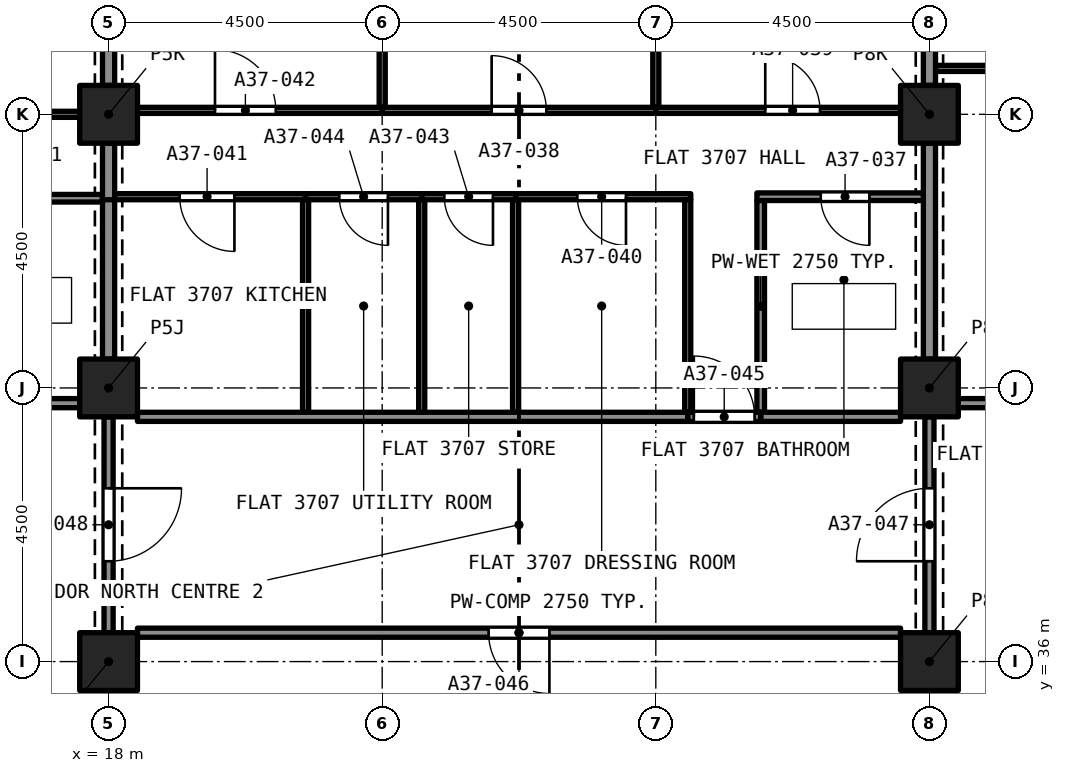
"""IFC4 building model, lengths in metres.
Left out: names, types, materials, properties, quantities, classifications, styles, units other than length and angle.
Written with IfcOpenShell. Run it as: python <this file> out.ifc"""

import sys

from ifc_helpers import new_model, si_unit, direction, frame, frame_2d, origin, origin_2d, place, context, subcontext, project, spatial, rectangle, extrude, element, fill, save


model = new_model("IFC4")
c1 = context("Model", 3, precision=1e-05, world=origin(), true_north=direction((0.0, 1.0)))
c2 = subcontext(c1, "Body", "Model", "MODEL_VIEW")
j1 = project(units=[si_unit("LENGTHUNIT", "METRE"), si_unit("PLANEANGLEUNIT", "RADIAN")], contexts=[c1])
p1 = place(None, origin())
s1 = spatial("IfcSite", under=j1, at=p1, CompositionType="ELEMENT")
p2 = place(p1, origin())
s2 = spatial("IfcBuilding", under=s1, at=p2, CompositionType="ELEMENT")
p3 = place(p2, frame((0.0, 0.0, 133.4)))
s3 = spatial("IfcBuildingStorey", under=s2, at=p3, CompositionType="ELEMENT", Elevation=133.4)
for number, where, z_axis, x_axis in (
    (1, (18.0, 36.0, 0.0), (0.0, 0.0, 1.0), (1.0, 0.0, 0.0)),
    (2, (31.5, 36.0, 0.0), (0.0, 0.0, 1.0), (1.0, 0.0, 0.0)),
    (3, (18.0, 40.5, 0.0), (0.0, 0.0, 1.0), (1.0, 0.0, 0.0)),
    (4, (31.5, 40.5, 0.0), (0.0, 0.0, 1.0), (1.0, 0.0, 0.0)),
    (5, (18.0, 45.0, 0.0), (0.0, 0.0, 1.0), (1.0, 0.0, 0.0)),
    (6, (31.5, 45.0, 0.0), (0.0, 0.0, 1.0), (1.0, 0.0, 0.0)),
):
    element("IfcColumn", number, at=place(p3, frame(where, z_axis=z_axis, x_axis=x_axis)), inside=s3, PredefinedType="COLUMN", context=c2, shape_type="SweptSolid", body=[
        extrude(rectangle(XDim=0.95, YDim=0.95, at=origin_2d()), origin(), (0.0, 0.0, 1.0), 3.2),
    ])
p4 = place(p3, frame((17.9, 43.62, 0.0), z_axis=(0.0, 0.0, 1.0), x_axis=(-1.0, 0.0, 0.0)))
e7 = element("IfcWall", 7, at=p4, inside=s3, PredefinedType="PARTITIONING", context=c2, shape_type="SweptSolid", body=[
    extrude(rectangle(XDim=2.781, YDim=0.125, at=frame_2d((1.39, 0.0))), origin(), (0.0, 0.0, 1.0), 2.9),
])
p5 = place(p4, frame((0.94, 0.0, 0.0)))
e8 = element("IfcOpeningElement", 8, at=p5, cuts=e7, PredefinedType="OPENING", context=c2, shape_type="SweptSolid", body=[
    extrude(rectangle(XDim=0.8, YDim=2.1, at=frame_2d((0.4, 1.05))), frame((0.0, 0.073, 0.0), z_axis=(0.0, -1.0, 0.0), x_axis=(1.0, 0.0, 0.0)), (0.0, 0.0, 1.0), 0.145),
])
p6 = place(p3, frame((18.0, 40.975, 0.0), z_axis=(0.0, 0.0, 1.0), x_axis=(0.0, 1.0, 0.0)))
e9 = element("IfcWall", 9, at=p6, inside=s3, PredefinedType="PARTITIONING", context=c2, shape_type="SweptSolid", body=[
    extrude(rectangle(XDim=2.708, YDim=0.2, at=frame_2d((1.354, 0.0))), origin(), (0.0, 0.0, 1.0), 2.38),
])
p7 = place(p3, frame((13.5, 45.0, 0.0), z_axis=(0.0, 0.0, 1.0), x_axis=(1.0, 0.0, 0.0)))
e10 = element("IfcWall", 10, at=p7, inside=s3, PredefinedType="PARTITIONING", context=c2, shape_type="SweptSolid", body=[
    extrude(rectangle(XDim=4.025, YDim=0.1, at=frame_2d((2.012, 0.0))), origin(), (0.0, 0.0, 1.0), 2.9),
])
p8 = place(p7, frame((1.8, 0.0, 0.0)))
e11 = element("IfcOpeningElement", 11, at=p8, cuts=e10, PredefinedType="OPENING", context=c2, shape_type="SweptSolid", body=[
    extrude(rectangle(XDim=0.9, YDim=2.1, at=frame_2d((0.45, 1.05))), frame((0.0, 0.06, 0.0), z_axis=(0.0, -1.0, 0.0), x_axis=(1.0, 0.0, 0.0)), (0.0, 0.0, 1.0), 0.12),
])
p9 = place(p3, frame((18.0, 45.475, 0.0), z_axis=(0.0, 0.0, 1.0), x_axis=(0.0, 1.0, 0.0)))
e12 = element("IfcWall", 12, at=p9, inside=s3, PredefinedType="PARTITIONING", context=c2, shape_type="SweptSolid", body=[
    extrude(rectangle(XDim=3.55, YDim=0.2, at=frame_2d((1.775, 0.0))), origin(), (0.0, 0.0, 1.0), 2.38),
])
p10 = place(p3, frame((18.0, 43.595, 0.0), z_axis=(0.0, 0.0, 1.0), x_axis=(0.0, 1.0, 0.0)))
e13 = element("IfcWall", 13, at=p10, inside=s3, PredefinedType="PARTITIONING", context=c2, shape_type="SweptSolid", body=[
    extrude(rectangle(XDim=0.93, YDim=0.2, at=frame_2d((0.465, 0.0))), origin(), (0.0, 0.0, 1.0), 2.38),
])
p11 = place(p3, frame((13.25, 40.25, 0.0), z_axis=(0.0, 0.0, 1.0), x_axis=(1.0, 0.0, 0.0)))
e14 = element("IfcWall", 14, at=p11, inside=s3, PredefinedType="PARTITIONING", context=c2, shape_type="SweptSolid", body=[
    extrude(rectangle(XDim=4.275, YDim=0.15, at=frame_2d((2.137, 0.0))), origin(), (0.0, 0.0, 1.0), 2.9),
])
p12 = place(p3, frame((31.6, 45.755, 0.0), z_axis=(0.0, 0.0, 1.0), x_axis=(1.0, 0.0, 0.0)))
e15 = element("IfcWall", 15, at=p12, inside=s3, PredefinedType="PARTITIONING", context=c2, shape_type="SweptSolid", body=[
    extrude(rectangle(XDim=4.4, YDim=0.1, at=frame_2d((2.2, 0.0))), origin(), (0.0, 0.0, 1.0), 2.9),
])
p13 = place(p12, frame((1.65, 0.0, 0.0)))
e16 = element("IfcOpeningElement", 16, at=p13, cuts=e15, PredefinedType="OPENING", context=c2, shape_type="SweptSolid", body=[
    extrude(rectangle(XDim=1.0, YDim=2.1, at=frame_2d((0.5, 1.05))), frame((0.0, 0.06, 0.0), z_axis=(0.0, -1.0, 0.0), x_axis=(1.0, 0.0, 0.0)), (0.0, 0.0, 1.0), 0.12),
])
for number, where, z_axis, x_axis in (
    (17, (31.5, 40.975, 0.0), (0.0, 0.0, 1.0), (0.0, 1.0, 0.0)),
    (18, (31.5, 45.475, 0.0), (0.0, 0.0, 1.0), (0.0, 1.0, 0.0)),
):
    element("IfcWall", number, at=place(p3, frame(where, z_axis=z_axis, x_axis=x_axis)), inside=s3, PredefinedType="PARTITIONING", context=c2, shape_type="SweptSolid", body=[
        extrude(rectangle(XDim=3.55, YDim=0.2, at=frame_2d((1.775, 0.0))), origin(), (0.0, 0.0, 1.0), 2.38),
    ])
p14 = place(p3, frame((31.975, 40.25, 0.0), z_axis=(0.0, 0.0, 1.0), x_axis=(1.0, 0.0, 0.0)))
e19 = element("IfcWall", 19, at=p14, inside=s3, PredefinedType="PARTITIONING", context=c2, shape_type="SweptSolid", body=[
    extrude(rectangle(XDim=2.375, YDim=0.15, at=frame_2d((1.188, 0.0))), origin(), (0.0, 0.0, 1.0), 2.9),
])
p15 = place(p14, frame((1.245, 0.0, 0.0)))
e20 = element("IfcOpeningElement", 20, at=p15, cuts=e19, PredefinedType="OPENING", context=c2, shape_type="SweptSolid", body=[
    extrude(rectangle(XDim=1.0, YDim=2.1, at=frame_2d((0.5, 1.05))), frame((0.0, 0.085, 0.0), z_axis=(0.0, -1.0, 0.0), x_axis=(1.0, 0.0, 0.0)), (0.0, 0.0, 1.0), 0.17),
])
p16 = place(p3, frame((28.725, 40.1, 0.0), z_axis=(0.0, 0.0, 1.0), x_axis=(0.0, 1.0, 0.0)))
e21 = element("IfcWall", 21, at=p16, inside=s3, PredefinedType="PARTITIONING", context=c2, shape_type="SweptSolid", body=[
    extrude(rectangle(XDim=3.482, YDim=0.125, at=frame_2d((1.741, 0.0))), origin(), (0.0, 0.0, 1.0), 2.75),
])
p17 = place(p3, frame((31.4, 43.645, 0.0), z_axis=(0.0, 0.0, 1.0), x_axis=(-1.0, 0.0, 0.0)))
e22 = element("IfcWall", 22, at=p17, inside=s3, PredefinedType="PARTITIONING", context=c2, shape_type="SweptSolid", body=[
    extrude(rectangle(XDim=2.737, YDim=0.125, at=frame_2d((1.369, 0.0))), origin(), (0.0, 0.0, 1.0), 2.75),
])
p18 = place(p17, frame((0.887, 0.0, 0.0)))
e23 = element("IfcOpeningElement", 23, at=p18, cuts=e22, PredefinedType="OPENING", context=c2, shape_type="SweptSolid", body=[
    extrude(rectangle(XDim=0.8, YDim=2.1, at=frame_2d((0.4, 1.05))), frame((0.0, 0.073, 0.0), z_axis=(0.0, -1.0, 0.0), x_axis=(1.0, 0.0, 0.0)), (0.0, 0.0, 1.0), 0.145),
])
p19 = place(p3, frame((28.725, 40.025, 0.0), z_axis=(0.0, 0.0, 1.0), x_axis=(1.0, 0.0, 0.0)))
e24 = element("IfcWall", 24, at=p19, inside=s3, PredefinedType="PARTITIONING", context=c2, shape_type="SweptSolid", body=[
    extrude(rectangle(XDim=2.3, YDim=0.15, at=frame_2d((1.15, 0.0))), origin(), (0.0, 0.0, 1.0), 2.75),
])
p20 = place(p3, frame((27.0, 45.115, 0.0), z_axis=(0.0, 0.0, 1.0), x_axis=(0.0, 1.0, 0.0)))
e25 = element("IfcWall", 25, at=p20, inside=s3, PredefinedType="PARTITIONING", context=c2, shape_type="SweptSolid", body=[
    extrude(rectangle(XDim=3.91, YDim=0.1, at=frame_2d((1.955, 0.0))), origin(), (0.0, 0.0, 1.0), 2.75),
])
p21 = place(p3, frame((22.5, 45.065, 0.0), z_axis=(0.0, 0.0, 1.0), x_axis=(1.0, 0.0, 0.0)))
e26 = element("IfcWall", 26, at=p21, inside=s3, PredefinedType="PARTITIONING", context=c2, shape_type="SweptSolid", body=[
    extrude(rectangle(XDim=4.5, YDim=0.1, at=frame_2d((2.25, 0.0))), origin(), (0.0, 0.0, 1.0), 2.75),
])
p22 = place(p21, frame((1.8, 0.0, 0.0)))
e27 = element("IfcOpeningElement", 27, at=p22, cuts=e26, PredefinedType="OPENING", context=c2, shape_type="SweptSolid", body=[
    extrude(rectangle(XDim=0.9, YDim=2.1, at=frame_2d((0.45, 1.05))), frame((0.0, 0.06, 0.0), z_axis=(0.0, -1.0, 0.0), x_axis=(1.0, 0.0, 0.0)), (0.0, 0.0, 1.0), 0.12),
])
p23 = place(p3, frame((22.5, 45.115, 0.0), z_axis=(0.0, 0.0, 1.0), x_axis=(0.0, 1.0, 0.0)))
e28 = element("IfcWall", 28, at=p23, inside=s3, PredefinedType="PARTITIONING", context=c2, shape_type="SweptSolid", body=[
    extrude(rectangle(XDim=3.91, YDim=0.1, at=frame_2d((1.955, 0.0))), origin(), (0.0, 0.0, 1.0), 2.75),
])
p24 = place(p3, frame((27.0, 45.065, 0.0), z_axis=(0.0, 0.0, 1.0), x_axis=(1.0, 0.0, 0.0)))
e29 = element("IfcWall", 29, at=p24, inside=s3, PredefinedType="PARTITIONING", context=c2, shape_type="SweptSolid", body=[
    extrude(rectangle(XDim=4.025, YDim=0.1, at=frame_2d((2.012, 0.0))), origin(), (0.0, 0.0, 1.0), 2.75),
])
p25 = place(p24, frame((1.8, 0.0, 0.0)))
e30 = element("IfcOpeningElement", 30, at=p25, cuts=e29, PredefinedType="OPENING", context=c2, shape_type="SweptSolid", body=[
    extrude(rectangle(XDim=0.9, YDim=2.1, at=frame_2d((0.45, 1.05))), frame((0.0, 0.06, 0.0), z_axis=(0.0, -1.0, 0.0), x_axis=(1.0, 0.0, 0.0)), (0.0, 0.0, 1.0), 0.12),
])
p26 = place(p3, frame((27.575, 43.645, 0.0), z_axis=(0.0, 0.0, 1.0), x_axis=(-1.0, 0.0, 0.0)))
e31 = element("IfcWall", 31, at=p26, inside=s3, PredefinedType="PARTITIONING", context=c2, shape_type="SweptSolid", body=[
    extrude(rectangle(XDim=2.881, YDim=0.1, at=frame_2d((1.44, 0.0))), origin(), (0.0, 0.0, 1.0), 2.75),
])
p27 = place(p26, frame((1.066, 0.0, 0.0)))
e32 = element("IfcOpeningElement", 32, at=p27, cuts=e31, PredefinedType="OPENING", context=c2, shape_type="SweptSolid", body=[
    extrude(rectangle(XDim=0.8, YDim=2.1, at=frame_2d((0.4, 1.05))), frame((0.0, 0.06, 0.0), z_axis=(0.0, -1.0, 0.0), x_axis=(1.0, 0.0, 0.0)), (0.0, 0.0, 1.0), 0.12),
])
for number, where, z_axis, x_axis in (
    (33, (27.525, 40.1, 0.0), (0.0, 0.0, 1.0), (0.0, 1.0, 0.0)),
    (34, (24.694, 40.1, 0.0), (0.0, 0.0, 1.0), (0.0, 1.0, 0.0)),
):
    element("IfcWall", number, at=place(p3, frame(where, z_axis=z_axis, x_axis=x_axis)), inside=s3, PredefinedType="PARTITIONING", context=c2, shape_type="SweptSolid", body=[
        extrude(rectangle(XDim=3.495, YDim=0.1, at=frame_2d((1.748, 0.0))), origin(), (0.0, 0.0, 1.0), 2.75),
    ])
p28 = place(p3, frame((21.24, 43.645, 0.0), z_axis=(0.0, 0.0, 1.0), x_axis=(-1.0, 0.0, 0.0)))
e35 = element("IfcWall", 35, at=p28, inside=s3, PredefinedType="PARTITIONING", context=c2, shape_type="SweptSolid", body=[
    extrude(rectangle(XDim=3.14, YDim=0.1, at=frame_2d((1.57, 0.0))), origin(), (0.0, 0.0, 1.0), 2.75),
])
p29 = place(p28, frame((1.17, 0.0, 0.0)))
e36 = element("IfcOpeningElement", 36, at=p29, cuts=e35, PredefinedType="OPENING", context=c2, shape_type="SweptSolid", body=[
    extrude(rectangle(XDim=0.9, YDim=2.1, at=frame_2d((0.45, 1.05))), frame((0.0, 0.06, 0.0), z_axis=(0.0, -1.0, 0.0), x_axis=(1.0, 0.0, 0.0)), (0.0, 0.0, 1.0), 0.12),
])
p30 = place(p3, frame((18.475, 45.065, 0.0), z_axis=(0.0, 0.0, 1.0), x_axis=(1.0, 0.0, 0.0)))
e37 = element("IfcWall", 37, at=p30, inside=s3, PredefinedType="PARTITIONING", context=c2, shape_type="SweptSolid", body=[
    extrude(rectangle(XDim=4.025, YDim=0.1, at=frame_2d((2.012, 0.0))), origin(), (0.0, 0.0, 1.0), 2.75),
])
p31 = place(p30, frame((1.275, 0.0, 0.0)))
e38 = element("IfcOpeningElement", 38, at=p31, cuts=e37, PredefinedType="OPENING", context=c2, shape_type="SweptSolid", body=[
    extrude(rectangle(XDim=1.0, YDim=2.1, at=frame_2d((0.5, 1.05))), frame((0.0, 0.06, 0.0), z_axis=(0.0, -1.0, 0.0), x_axis=(1.0, 0.0, 0.0)), (0.0, 0.0, 1.0), 0.12),
])
p32 = place(p3, frame((24.694, 43.645, 0.0), z_axis=(0.0, 0.0, 1.0), x_axis=(-1.0, 0.0, 0.0)))
e39 = element("IfcWall", 39, at=p32, inside=s3, PredefinedType="PARTITIONING", context=c2, shape_type="SweptSolid", body=[
    extrude(rectangle(XDim=1.544, YDim=0.1, at=frame_2d((0.772, 0.0))), origin(), (0.0, 0.0, 1.0), 2.75),
])
p33 = place(p32, frame((0.372, 0.0, 0.0)))
e40 = element("IfcOpeningElement", 40, at=p33, cuts=e39, PredefinedType="OPENING", context=c2, shape_type="SweptSolid", body=[
    extrude(rectangle(XDim=0.8, YDim=2.1, at=frame_2d((0.4, 1.05))), frame((0.0, 0.06, 0.0), z_axis=(0.0, -1.0, 0.0), x_axis=(1.0, 0.0, 0.0)), (0.0, 0.0, 1.0), 0.12),
])
p34 = place(p3, frame((23.15, 43.645, 0.0), z_axis=(0.0, 0.0, 1.0), x_axis=(-1.0, 0.0, 0.0)))
e41 = element("IfcWall", 41, at=p34, inside=s3, PredefinedType="PARTITIONING", context=c2, shape_type="SweptSolid", body=[
    extrude(rectangle(XDim=1.91, YDim=0.1, at=frame_2d((0.955, 0.0))), origin(), (0.0, 0.0, 1.0), 2.75),
])
p35 = place(p34, frame((0.555, 0.0, 0.0)))
e42 = element("IfcOpeningElement", 42, at=p35, cuts=e41, PredefinedType="OPENING", context=c2, shape_type="SweptSolid", body=[
    extrude(rectangle(XDim=0.8, YDim=2.1, at=frame_2d((0.4, 1.05))), frame((0.0, 0.06, 0.0), z_axis=(0.0, -1.0, 0.0), x_axis=(1.0, 0.0, 0.0)), (0.0, 0.0, 1.0), 0.12),
])
p36 = place(p3, frame((27.525, 40.025, 0.0), z_axis=(0.0, 0.0, 1.0), x_axis=(1.0, 0.0, 0.0)))
e43 = element("IfcWall", 43, at=p36, inside=s3, PredefinedType="PARTITIONING", context=c2, shape_type="SweptSolid", body=[
    extrude(rectangle(XDim=1.2, YDim=0.15, at=frame_2d((0.6, 0.0))), origin(), (0.0, 0.0, 1.0), 2.75),
])
p37 = place(p36, frame((0.1, 0.0, 0.0)))
e44 = element("IfcOpeningElement", 44, at=p37, cuts=e43, PredefinedType="OPENING", context=c2, shape_type="SweptSolid", body=[
    extrude(rectangle(XDim=1.0, YDim=2.1, at=frame_2d((0.5, 1.05))), frame((0.0, 0.085, 0.0), z_axis=(0.0, -1.0, 0.0), x_axis=(1.0, 0.0, 0.0)), (0.0, 0.0, 1.0), 0.17),
])
p38 = place(p3, frame((21.24, 40.1, 0.0), z_axis=(0.0, 0.0, 1.0), x_axis=(0.0, 1.0, 0.0)))
e45 = element("IfcWall", 45, at=p38, inside=s3, PredefinedType="PARTITIONING", context=c2, shape_type="SweptSolid", body=[
    extrude(rectangle(XDim=3.495, YDim=0.1, at=frame_2d((1.748, 0.0))), origin(), (0.0, 0.0, 1.0), 2.75),
])
p39 = place(p3, frame((18.475, 40.025, 0.0), z_axis=(0.0, 0.0, 1.0), x_axis=(1.0, 0.0, 0.0)))
e46 = element("IfcWall", 46, at=p39, inside=s3, PredefinedType="PARTITIONING", context=c2, shape_type="SweptSolid", body=[
    extrude(rectangle(XDim=9.05, YDim=0.15, at=frame_2d((4.525, 0.0))), origin(), (0.0, 0.0, 1.0), 2.75),
])
p40 = place(p3, frame((23.15, 40.1, 0.0), z_axis=(0.0, 0.0, 1.0), x_axis=(0.0, 1.0, 0.0)))
e47 = element("IfcWall", 47, at=p40, inside=s3, PredefinedType="PARTITIONING", context=c2, shape_type="SweptSolid", body=[
    extrude(rectangle(XDim=3.495, YDim=0.1, at=frame_2d((1.748, 0.0))), origin(), (0.0, 0.0, 1.0), 2.75),
])
p41 = place(p3, frame((31.025, 36.475, 0.0), z_axis=(0.0, 0.0, 1.0), x_axis=(-1.0, 0.0, 0.0)))
e48 = element("IfcWall", 48, at=p41, inside=s3, PredefinedType="PARTITIONING", context=c2, shape_type="SweptSolid", body=[
    extrude(rectangle(XDim=12.55, YDim=0.15, at=frame_2d((6.275, 0.0))), origin(), (0.0, 0.0, 1.0), 2.75),
])
p42 = place(p41, frame((5.775, 0.0, 0.0)))
e49 = element("IfcOpeningElement", 49, at=p42, cuts=e48, PredefinedType="OPENING", context=c2, shape_type="SweptSolid", body=[
    extrude(rectangle(XDim=1.0, YDim=2.1, at=frame_2d((0.5, 1.05))), frame((0.0, 0.085, 0.0), z_axis=(0.0, -1.0, 0.0), x_axis=(1.0, 0.0, 0.0)), (0.0, 0.0, 1.0), 0.17),
])
p43 = place(p3, frame((31.5, 36.475, 0.0), z_axis=(0.0, 0.0, 1.0), x_axis=(0.0, 1.0, 0.0)))
e50 = element("IfcWall", 50, at=p43, inside=s3, PredefinedType="PARTITIONING", context=c2, shape_type="SweptSolid", body=[
    extrude(rectangle(XDim=3.55, YDim=0.15, at=frame_2d((1.775, 0.0))), origin(), (0.0, 0.0, 1.0), 2.38),
])
p44 = place(p43, frame((1.175, 0.0, 0.0)))
e51 = element("IfcOpeningElement", 51, at=p44, cuts=e50, PredefinedType="OPENING", context=c2, shape_type="SweptSolid", body=[
    extrude(rectangle(XDim=1.2, YDim=2.1, at=frame_2d((0.6, 1.05))), frame((0.0, 0.085, 0.0), z_axis=(0.0, -1.0, 0.0), x_axis=(1.0, 0.0, 0.0)), (0.0, 0.0, 1.0), 0.17),
])
p45 = place(p3, frame((18.0, 40.025, 0.0), z_axis=(0.0, 0.0, 1.0), x_axis=(0.0, -1.0, 0.0)))
e52 = element("IfcWall", 52, at=p45, inside=s3, PredefinedType="PARTITIONING", context=c2, shape_type="SweptSolid", body=[
    extrude(rectangle(XDim=3.55, YDim=0.15, at=frame_2d((1.775, 0.0))), origin(), (0.0, 0.0, 1.0), 2.38),
])
p46 = place(p45, frame((1.175, 0.0, 0.0)))
e53 = element("IfcOpeningElement", 53, at=p46, cuts=e52, PredefinedType="OPENING", context=c2, shape_type="SweptSolid", body=[
    extrude(rectangle(XDim=1.2, YDim=2.1, at=frame_2d((0.6, 1.05))), frame((0.0, 0.085, 0.0), z_axis=(0.0, -1.0, 0.0), x_axis=(1.0, 0.0, 0.0)), (0.0, 0.0, 1.0), 0.17),
])
for number, where, z_axis, x_axis in (
    (54, (31.5, 31.975, 0.0), (0.0, 0.0, 1.0), (0.0, 1.0, 0.0)),
    (55, (18.0, 31.975, 0.0), (0.0, 0.0, 1.0), (0.0, 1.0, 0.0)),
):
    element("IfcWall", number, at=place(p3, frame(where, z_axis=z_axis, x_axis=x_axis)), inside=s3, PredefinedType="PARTITIONING", context=c2, shape_type="SweptSolid", body=[
        extrude(rectangle(XDim=3.55, YDim=0.15, at=frame_2d((1.775, 0.0))), origin(), (0.0, 0.0, 1.0), 2.38),
    ])
p47 = place(p18, origin())
e56 = element("IfcDoor", 56, at=p47, inside=s3, OperationType="SINGLE_SWING_LEFT", PredefinedType="DOOR", context=c2, shape_type="SweptSolid", body=[
    extrude(rectangle(XDim=0.8, YDim=2.1, at=frame_2d((0.4, 1.05))), frame((0.0, 0.025, 0.0), z_axis=(0.0, -1.0, 0.0), x_axis=(1.0, 0.0, 0.0)), (0.0, 0.0, 1.0), 0.05),
])
fill(e23, e56)
p48 = place(p22, origin())
e57 = element("IfcDoor", 57, at=p48, inside=s3, OperationType="SINGLE_SWING_LEFT", PredefinedType="DOOR", context=c2, shape_type="SweptSolid", body=[
    extrude(rectangle(XDim=0.9, YDim=2.1, at=frame_2d((0.45, 1.05))), frame((0.0, 0.025, 0.0), z_axis=(0.0, -1.0, 0.0), x_axis=(1.0, 0.0, 0.0)), (0.0, 0.0, 1.0), 0.05),
])
fill(e27, e57)
p49 = place(p25, origin())
e58 = element("IfcDoor", 58, at=p49, inside=s3, OperationType="SINGLE_SWING_RIGHT", PredefinedType="DOOR", context=c2, shape_type="SweptSolid", body=[
    extrude(rectangle(XDim=0.9, YDim=2.1, at=frame_2d((0.45, 1.05))), frame((0.0, 0.025, 0.0), z_axis=(0.0, -1.0, 0.0), x_axis=(1.0, 0.0, 0.0)), (0.0, 0.0, 1.0), 0.05),
])
fill(e30, e58)
p50 = place(p27, origin())
e59 = element("IfcDoor", 59, at=p50, inside=s3, OperationType="SINGLE_SWING_RIGHT", PredefinedType="DOOR", context=c2, shape_type="SweptSolid", body=[
    extrude(rectangle(XDim=0.8, YDim=2.1, at=frame_2d((0.4, 1.05))), frame((0.0, 0.025, 0.0), z_axis=(0.0, -1.0, 0.0), x_axis=(1.0, 0.0, 0.0)), (0.0, 0.0, 1.0), 0.05),
])
fill(e32, e59)
p51 = place(p29, origin())
e60 = element("IfcDoor", 60, at=p51, inside=s3, OperationType="SINGLE_SWING_RIGHT", PredefinedType="DOOR", context=c2, shape_type="SweptSolid", body=[
    extrude(rectangle(XDim=0.9, YDim=2.1, at=frame_2d((0.45, 1.05))), frame((0.0, 0.025, 0.0), z_axis=(0.0, -1.0, 0.0), x_axis=(1.0, 0.0, 0.0)), (0.0, 0.0, 1.0), 0.05),
])
fill(e36, e60)
p52 = place(p31, origin())
e61 = element("IfcDoor", 61, at=p52, inside=s3, OperationType="SINGLE_SWING_LEFT", PredefinedType="DOOR", context=c2, shape_type="SweptSolid", body=[
    extrude(rectangle(XDim=1.0, YDim=2.1, at=frame_2d((0.5, 1.05))), frame((0.0, 0.025, 0.0), z_axis=(0.0, -1.0, 0.0), x_axis=(1.0, 0.0, 0.0)), (0.0, 0.0, 1.0), 0.05),
])
fill(e38, e61)
p53 = place(p33, origin())
e62 = element("IfcDoor", 62, at=p53, inside=s3, OperationType="SINGLE_SWING_LEFT", PredefinedType="DOOR", context=c2, shape_type="SweptSolid", body=[
    extrude(rectangle(XDim=0.8, YDim=2.1, at=frame_2d((0.4, 1.05))), frame((0.0, 0.025, 0.0), z_axis=(0.0, -1.0, 0.0), x_axis=(1.0, 0.0, 0.0)), (0.0, 0.0, 1.0), 0.05),
])
fill(e40, e62)
p54 = place(p35, origin())
e63 = element("IfcDoor", 63, at=p54, inside=s3, OperationType="SINGLE_SWING_LEFT", PredefinedType="DOOR", context=c2, shape_type="SweptSolid", body=[
    extrude(rectangle(XDim=0.8, YDim=2.1, at=frame_2d((0.4, 1.05))), frame((0.0, 0.025, 0.0), z_axis=(0.0, -1.0, 0.0), x_axis=(1.0, 0.0, 0.0)), (0.0, 0.0, 1.0), 0.05),
])
fill(e42, e63)
p55 = place(p37, origin())
e64 = element("IfcDoor", 64, at=p55, inside=s3, OperationType="SINGLE_SWING_RIGHT", PredefinedType="DOOR", context=c2, shape_type="SweptSolid", body=[
    extrude(rectangle(XDim=1.0, YDim=2.1, at=frame_2d((0.5, 1.05))), frame((0.0, 0.025, 0.0), z_axis=(0.0, -1.0, 0.0), x_axis=(1.0, 0.0, 0.0)), (0.0, 0.0, 1.0), 0.05),
])
fill(e44, e64)
p56 = place(p42, origin())
e65 = element("IfcDoor", 65, at=p56, inside=s3, OperationType="SINGLE_SWING_RIGHT", PredefinedType="DOOR", context=c2, shape_type="SweptSolid", body=[
    extrude(rectangle(XDim=1.0, YDim=2.1, at=frame_2d((0.5, 1.05))), frame((0.0, 0.025, 0.0), z_axis=(0.0, -1.0, 0.0), x_axis=(1.0, 0.0, 0.0)), (0.0, 0.0, 1.0), 0.05),
])
fill(e49, e65)
p57 = place(p44, origin())
e66 = element("IfcDoor", 66, at=p57, inside=s3, OperationType="SINGLE_SWING_LEFT", PredefinedType="DOOR", context=c2, shape_type="SweptSolid", body=[
    extrude(rectangle(XDim=1.2, YDim=2.1, at=frame_2d((0.6, 1.05))), frame((0.0, 0.025, 0.0), z_axis=(0.0, -1.0, 0.0), x_axis=(1.0, 0.0, 0.0)), (0.0, 0.0, 1.0), 0.05),
])
fill(e51, e66)
p58 = place(p46, origin())
e67 = element("IfcDoor", 67, at=p58, inside=s3, OperationType="SINGLE_SWING_LEFT", PredefinedType="DOOR", context=c2, shape_type="SweptSolid", body=[
    extrude(rectangle(XDim=1.2, YDim=2.1, at=frame_2d((0.6, 1.05))), frame((0.0, 0.025, 0.0), z_axis=(0.0, -1.0, 0.0), x_axis=(1.0, 0.0, 0.0)), (0.0, 0.0, 1.0), 0.05),
])
fill(e53, e67)
save(model, sys.argv[1])
